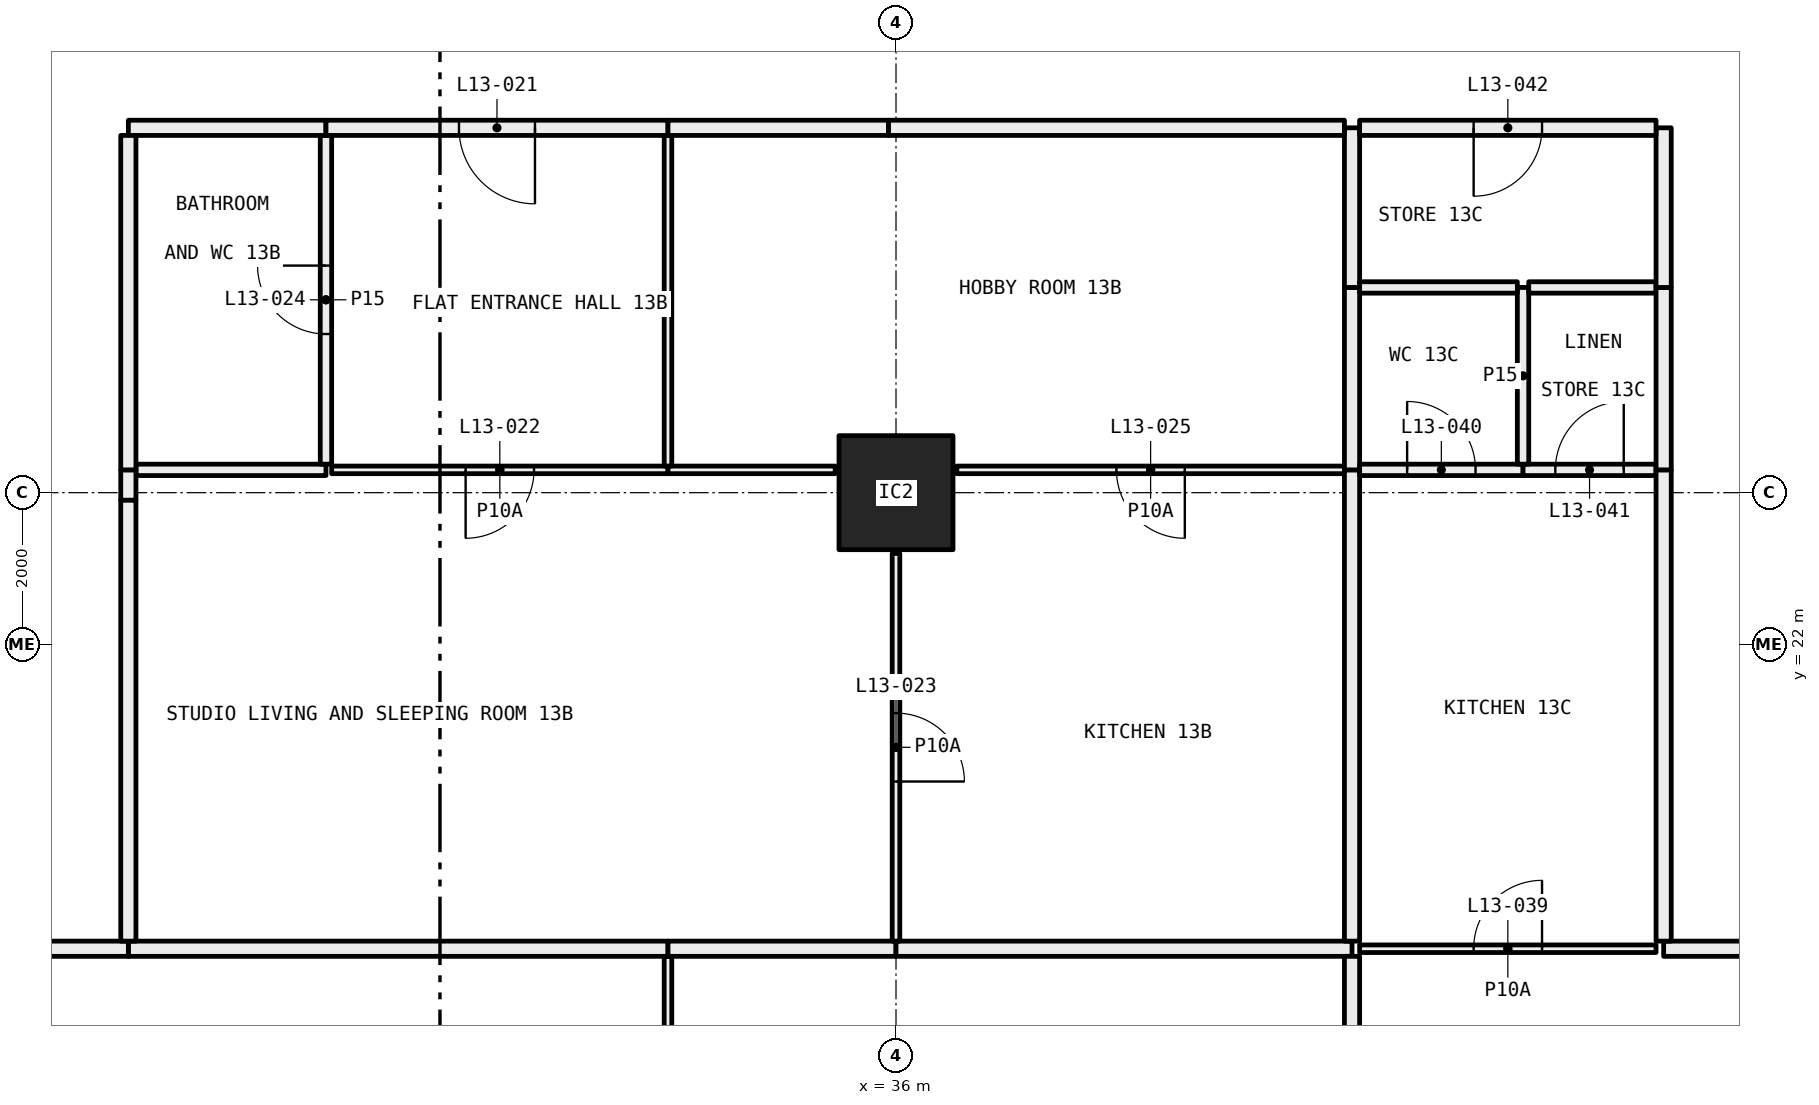
"""IFC4 building model, lengths in metres.
Left out: names, types, materials, properties, quantities, classifications, styles, units other than length and angle.
Written with IfcOpenShell. Run it as: python <this file> out.ifc"""

import sys

from ifc_helpers import new_model, si_unit, direction, frame, frame_2d, origin, origin_2d, place, context, subcontext, project, spatial, rectangle, hollow_rectangle, extrude, element, fill, save


model = new_model("IFC4")
c1 = context("Model", 3, precision=1e-05, world=origin(), true_north=direction((0.0, 1.0)))
c2 = subcontext(c1, "Body", "Model", "MODEL_VIEW")
j1 = project(units=[si_unit("LENGTHUNIT", "METRE"), si_unit("PLANEANGLEUNIT", "RADIAN")], contexts=[c1])
p1 = place(None, origin())
s1 = spatial("IfcSite", under=j1, at=p1, CompositionType="ELEMENT")
p2 = place(p1, origin())
s2 = spatial("IfcBuilding", under=s1, at=p2, CompositionType="ELEMENT")
p3 = place(p2, frame((0.0, 0.0, 57.6)))
s3 = spatial("IfcBuildingStorey", under=s2, at=p3, CompositionType="ELEMENT", Elevation=57.6)
p4 = place(p3, frame((36.0, 24.0, 0.0), z_axis=(0.0, 0.0, 1.0), x_axis=(1.0, 0.0, 0.0)))
e1 = element("IfcColumn", 1, at=p4, inside=s3, PredefinedType="COLUMN", context=c2, shape_type="SweptSolid", body=[
    extrude(hollow_rectangle(XDim=1.5, YDim=1.5, WallThickness=0.065, at=origin_2d()), origin(), (0.0, 0.0, 1.0), 3.05),
])
p5 = place(p3, frame((33.0, 12.05, 0.0), z_axis=(0.0, 0.0, 1.0), x_axis=(0.0, 1.0, 0.0)))
e2 = element("IfcWall", 2, at=p5, inside=s3, PredefinedType="PARTITIONING", context=c2, shape_type="SweptSolid", body=[
    extrude(rectangle(XDim=5.85, YDim=0.1, at=frame_2d((2.925, 0.0))), origin(), (0.0, 0.0, 1.0), 2.45),
])
p6 = place(p3, frame((33.0, 18.0, 0.0), z_axis=(0.0, 0.0, 1.0), x_axis=(-1.0, 0.0, 0.0)))
e3 = element("IfcWall", 3, at=p6, inside=s3, PredefinedType="PARTITIONING", context=c2, shape_type="SweptSolid", body=[
    extrude(rectangle(XDim=7.1, YDim=0.2, at=frame_2d((3.55, 0.0))), origin(), (0.0, 0.0, 1.0), 3.05),
])
p7 = place(p3, frame((25.9, 18.0, 0.0), z_axis=(0.0, 0.0, 1.0), x_axis=(-1.0, 0.0, 0.0)))
e4 = element("IfcWall", 4, at=p7, inside=s3, PredefinedType="PARTITIONING", context=c2, shape_type="SweptSolid", body=[
    extrude(rectangle(XDim=1.9, YDim=0.2, at=frame_2d((0.95, 0.0))), origin(), (0.0, 0.0, 1.0), 3.05),
])
p8 = place(p3, frame((36.0, 18.0, 0.0), z_axis=(0.0, 0.0, 1.0), x_axis=(-1.0, 0.0, 0.0)))
e5 = element("IfcWall", 5, at=p8, inside=s3, PredefinedType="PARTITIONING", context=c2, shape_type="SweptSolid", body=[
    extrude(rectangle(XDim=3.0, YDim=0.2, at=frame_2d((1.5, 0.0))), origin(), (0.0, 0.0, 1.0), 2.45),
])
p9 = place(p3, frame((42.0, 18.0, 0.0), z_axis=(0.0, 0.0, 1.0), x_axis=(-1.0, 0.0, 0.0)))
e6 = element("IfcWall", 6, at=p9, inside=s3, PredefinedType="PARTITIONING", context=c2, shape_type="SweptSolid", body=[
    extrude(rectangle(XDim=6.0, YDim=0.2, at=frame_2d((3.0, 0.0))), origin(), (0.0, 0.0, 1.0), 2.45),
])
p10 = place(p3, frame((42.0, 12.0, 0.0), z_axis=(0.0, 0.0, 1.0), x_axis=(0.0, 1.0, 0.0)))
e7 = element("IfcWall", 7, at=p10, inside=s3, PredefinedType="PARTITIONING", context=c2, shape_type="SweptSolid", body=[
    extrude(rectangle(XDim=5.9, YDim=0.2, at=frame_2d((2.95, 0.0))), origin(), (0.0, 0.0, 1.0), 2.45),
])
p11 = place(p3, frame((36.0, 18.1, 0.0), z_axis=(0.0, 0.0, 1.0), x_axis=(0.0, 1.0, 0.0)))
e8 = element("IfcWall", 8, at=p11, inside=s3, PredefinedType="PARTITIONING", context=c2, shape_type="SweptSolid", body=[
    extrude(rectangle(XDim=5.1, YDim=0.1, at=frame_2d((2.55, 0.0))), origin(), (0.0, 0.0, 1.0), 2.45),
])
p12 = place(p11, frame((2.1, 0.0, 0.0)))
e9 = element("IfcOpeningElement", 9, at=p12, cuts=e8, PredefinedType="OPENING", context=c2, shape_type="SweptSolid", body=[
    extrude(rectangle(XDim=0.9, YDim=2.1, at=frame_2d((0.45, 1.05))), frame((0.0, 0.06, 0.0), z_axis=(0.0, -1.0, 0.0), x_axis=(1.0, 0.0, 0.0)), (0.0, 0.0, 1.0), 0.12),
])
p13 = place(p3, frame((28.5, 24.3, 0.0), z_axis=(0.0, 0.0, 1.0), x_axis=(-1.0, 0.0, 0.0)))
e10 = element("IfcWall", 10, at=p13, inside=s3, PredefinedType="PARTITIONING", context=c2, shape_type="SweptSolid", body=[
    extrude(rectangle(XDim=2.5, YDim=0.15, at=frame_2d((1.25, 0.0))), origin(), (0.0, 0.0, 1.0), 3.05),
])
p14 = place(p3, frame((33.0, 24.3, 0.0), z_axis=(0.0, 0.0, 1.0), x_axis=(-1.0, 0.0, 0.0)))
e11 = element("IfcWall", 11, at=p14, inside=s3, PredefinedType="PARTITIONING", context=c2, shape_type="SweptSolid", body=[
    extrude(rectangle(XDim=4.425, YDim=0.1, at=frame_2d((2.212, 0.0))), origin(), (0.0, 0.0, 1.0), 3.05),
])
p15 = place(p14, frame((1.762, 0.0, 0.0)))
e12 = element("IfcOpeningElement", 12, at=p15, cuts=e11, PredefinedType="OPENING", context=c2, shape_type="SweptSolid", body=[
    extrude(rectangle(XDim=0.9, YDim=2.1, at=frame_2d((0.45, 1.05))), frame((0.0, 0.06, 0.0), z_axis=(0.0, -1.0, 0.0), x_axis=(1.0, 0.0, 0.0)), (0.0, 0.0, 1.0), 0.12),
])
p16 = place(p3, frame((35.2, 24.3, 0.0), z_axis=(0.0, 0.0, 1.0), x_axis=(-1.0, 0.0, 0.0)))
e13 = element("IfcWall", 13, at=p16, inside=s3, PredefinedType="PARTITIONING", context=c2, shape_type="SweptSolid", body=[
    extrude(rectangle(XDim=2.2, YDim=0.1, at=frame_2d((1.1, 0.0))), origin(), (0.0, 0.0, 1.0), 3.05),
])
p17 = place(p3, frame((25.9, 24.3, 0.0), z_axis=(0.0, 0.0, 1.0), x_axis=(0.0, -1.0, 0.0)))
e14 = element("IfcWall", 14, at=p17, inside=s3, PredefinedType="PARTITIONING", context=c2, shape_type="SweptSolid", body=[
    extrude(rectangle(XDim=0.4, YDim=0.2, at=frame_2d((0.2, 0.0))), origin(), (0.0, 0.0, 1.0), 2.45),
])
p18 = place(p3, frame((25.9, 23.9, 0.0), z_axis=(0.0, 0.0, 1.0), x_axis=(0.0, -1.0, 0.0)))
e15 = element("IfcWall", 15, at=p18, inside=s3, PredefinedType="PARTITIONING", context=c2, shape_type="SweptSolid", body=[
    extrude(rectangle(XDim=5.8, YDim=0.2, at=frame_2d((2.9, 0.0))), origin(), (0.0, 0.0, 1.0), 3.05),
])
p19 = place(p3, frame((41.9, 24.3, 0.0), z_axis=(0.0, 0.0, 1.0), x_axis=(-1.0, 0.0, 0.0)))
e16 = element("IfcWall", 16, at=p19, inside=s3, PredefinedType="PARTITIONING", context=c2, shape_type="SweptSolid", body=[
    extrude(rectangle(XDim=5.1, YDim=0.1, at=frame_2d((2.55, 0.0))), origin(), (0.0, 0.0, 1.0), 3.05),
])
p20 = place(p19, frame((2.1, 0.0, 0.0)))
e17 = element("IfcOpeningElement", 17, at=p20, cuts=e16, PredefinedType="OPENING", context=c2, shape_type="SweptSolid", body=[
    extrude(rectangle(XDim=0.9, YDim=2.1, at=frame_2d((0.45, 1.05))), frame((0.0, 0.06, 0.0), z_axis=(0.0, -1.0, 0.0), x_axis=(1.0, 0.0, 0.0)), (0.0, 0.0, 1.0), 0.12),
])
p21 = place(p3, frame((42.0, 18.1, 0.0), z_axis=(0.0, 0.0, 1.0), x_axis=(0.0, 1.0, 0.0)))
e18 = element("IfcWall", 18, at=p21, inside=s3, PredefinedType="PARTITIONING", context=c2, shape_type="SweptSolid", body=[
    extrude(rectangle(XDim=6.2, YDim=0.2, at=frame_2d((3.1, 0.0))), origin(), (0.0, 0.0, 1.0), 2.45),
])
p22 = place(p3, frame((28.5, 24.375, 0.0), z_axis=(0.0, 0.0, 1.0), x_axis=(0.0, 1.0, 0.0)))
e19 = element("IfcWall", 19, at=p22, inside=s3, PredefinedType="PARTITIONING", context=c2, shape_type="SweptSolid", body=[
    extrude(rectangle(XDim=4.325, YDim=0.15, at=frame_2d((2.163, 0.0))), origin(), (0.0, 0.0, 1.0), 3.05),
])
p23 = place(p22, frame((1.712, 0.0, 0.0)))
e20 = element("IfcOpeningElement", 20, at=p23, cuts=e19, PredefinedType="OPENING", context=c2, shape_type="SweptSolid", body=[
    extrude(rectangle(XDim=0.9, YDim=2.1, at=frame_2d((0.45, 1.05))), frame((0.0, 0.085, 0.0), z_axis=(0.0, -1.0, 0.0), x_axis=(1.0, 0.0, 0.0)), (0.0, 0.0, 1.0), 0.17),
])
p24 = place(p3, frame((28.5, 28.8, 0.0), z_axis=(0.0, 0.0, 1.0), x_axis=(-1.0, 0.0, 0.0)))
e21 = element("IfcWall", 21, at=p24, inside=s3, PredefinedType="PARTITIONING", context=c2, shape_type="SweptSolid", body=[
    extrude(rectangle(XDim=2.6, YDim=0.2, at=frame_2d((1.3, 0.0))), origin(), (0.0, 0.0, 1.0), 3.05),
])
p25 = place(p3, frame((25.9, 28.7, 0.0), z_axis=(0.0, 0.0, 1.0), x_axis=(0.0, -1.0, 0.0)))
e22 = element("IfcWall", 22, at=p25, inside=s3, PredefinedType="PARTITIONING", context=c2, shape_type="SweptSolid", body=[
    extrude(rectangle(XDim=4.4, YDim=0.2, at=frame_2d((2.2, 0.0))), origin(), (0.0, 0.0, 1.0), 3.05),
])
p26 = place(p3, frame((33.0, 24.35, 0.0), z_axis=(0.0, 0.0, 1.0), x_axis=(0.0, 1.0, 0.0)))
e23 = element("IfcWall", 23, at=p26, inside=s3, PredefinedType="PARTITIONING", context=c2, shape_type="SweptSolid", body=[
    extrude(rectangle(XDim=4.35, YDim=0.1, at=frame_2d((2.175, 0.0))), origin(), (0.0, 0.0, 1.0), 3.05),
])
p27 = place(p3, frame((33.0, 28.8, 0.0), z_axis=(0.0, 0.0, 1.0), x_axis=(-1.0, 0.0, 0.0)))
e24 = element("IfcWall", 24, at=p27, inside=s3, PredefinedType="PARTITIONING", context=c2, shape_type="SweptSolid", body=[
    extrude(rectangle(XDim=4.5, YDim=0.2, at=frame_2d((2.25, 0.0))), origin(), (0.0, 0.0, 1.0), 3.05),
])
p28 = place(p27, frame((1.75, 0.0, 0.0)))
e25 = element("IfcOpeningElement", 25, at=p28, cuts=e24, PredefinedType="OPENING", context=c2, shape_type="SweptSolid", body=[
    extrude(rectangle(XDim=1.0, YDim=2.1, at=frame_2d((0.5, 1.05))), frame((0.0, 0.11, 0.0), z_axis=(0.0, -1.0, 0.0), x_axis=(1.0, 0.0, 0.0)), (0.0, 0.0, 1.0), 0.22),
])
p29 = place(p3, frame((42.0, 24.3, 0.0), z_axis=(0.0, 0.0, 1.0), x_axis=(0.0, 1.0, 0.0)))
e26 = element("IfcWall", 26, at=p29, inside=s3, PredefinedType="PARTITIONING", context=c2, shape_type="SweptSolid", body=[
    extrude(rectangle(XDim=2.4, YDim=0.2, at=frame_2d((1.2, 0.0))), origin(), (0.0, 0.0, 1.0), 3.05),
])
p30 = place(p3, frame((42.0, 26.7, 0.0), z_axis=(0.0, 0.0, 1.0), x_axis=(0.0, 1.0, 0.0)))
e27 = element("IfcWall", 27, at=p30, inside=s3, PredefinedType="PARTITIONING", context=c2, shape_type="SweptSolid", body=[
    extrude(rectangle(XDim=2.1, YDim=0.2, at=frame_2d((1.05, 0.0))), origin(), (0.0, 0.0, 1.0), 3.05),
])
p31 = place(p3, frame((41.9, 28.8, 0.0), z_axis=(0.0, 0.0, 1.0), x_axis=(-1.0, 0.0, 0.0)))
e28 = element("IfcWall", 28, at=p31, inside=s3, PredefinedType="PARTITIONING", context=c2, shape_type="SweptSolid", body=[
    extrude(rectangle(XDim=6.0, YDim=0.2, at=frame_2d((3.0, 0.0))), origin(), (0.0, 0.0, 1.0), 2.45),
])
p32 = place(p3, frame((35.9, 28.8, 0.0), z_axis=(0.0, 0.0, 1.0), x_axis=(-1.0, 0.0, 0.0)))
e29 = element("IfcWall", 29, at=p32, inside=s3, PredefinedType="PARTITIONING", context=c2, shape_type="SweptSolid", body=[
    extrude(rectangle(XDim=2.9, YDim=0.2, at=frame_2d((1.45, 0.0))), origin(), (0.0, 0.0, 1.0), 3.05),
])
p33 = place(p3, frame((46.0, 18.0, 0.0), z_axis=(0.0, 0.0, 1.0), x_axis=(-1.0, 0.0, 0.0)))
e30 = element("IfcWall", 30, at=p33, inside=s3, PredefinedType="PARTITIONING", context=c2, shape_type="SweptSolid", body=[
    extrude(rectangle(XDim=3.9, YDim=0.1, at=frame_2d((1.95, 0.0))), origin(), (0.0, 0.0, 1.0), 3.05),
])
p34 = place(p33, frame((1.5, 0.0, 0.0)))
e31 = element("IfcOpeningElement", 31, at=p34, cuts=e30, PredefinedType="OPENING", context=c2, shape_type="SweptSolid", body=[
    extrude(rectangle(XDim=0.9, YDim=2.1, at=frame_2d((0.45, 1.05))), frame((0.0, 0.06, 0.0), z_axis=(0.0, -1.0, 0.0), x_axis=(1.0, 0.0, 0.0)), (0.0, 0.0, 1.0), 0.12),
])
p35 = place(p3, frame((52.5, 18.0, 0.0), z_axis=(0.0, 0.0, 1.0), x_axis=(-1.0, 0.0, 0.0)))
e32 = element("IfcWall", 32, at=p35, inside=s3, PredefinedType="PARTITIONING", context=c2, shape_type="SweptSolid", body=[
    extrude(rectangle(XDim=6.4, YDim=0.2, at=frame_2d((3.2, 0.0))), origin(), (0.0, 0.0, 1.0), 3.05),
])
p36 = place(p3, frame((44.25, 24.3, 0.0), z_axis=(0.0, 0.0, 1.0), x_axis=(-1.0, 0.0, 0.0)))
e33 = element("IfcWall", 33, at=p36, inside=s3, PredefinedType="PARTITIONING", context=c2, shape_type="SweptSolid", body=[
    extrude(rectangle(XDim=2.15, YDim=0.15, at=frame_2d((1.075, 0.0))), origin(), (0.0, 0.0, 1.0), 3.05),
])
p37 = place(p36, frame((0.625, 0.0, 0.0)))
e34 = element("IfcOpeningElement", 34, at=p37, cuts=e33, PredefinedType="OPENING", context=c2, shape_type="SweptSolid", body=[
    extrude(rectangle(XDim=0.9, YDim=2.1, at=frame_2d((0.45, 1.05))), frame((0.0, 0.085, 0.0), z_axis=(0.0, -1.0, 0.0), x_axis=(1.0, 0.0, 0.0)), (0.0, 0.0, 1.0), 0.17),
])
p38 = place(p3, frame((46.0, 24.3, 0.0), z_axis=(0.0, 0.0, 1.0), x_axis=(-1.0, 0.0, 0.0)))
e35 = element("IfcWall", 35, at=p38, inside=s3, PredefinedType="PARTITIONING", context=c2, shape_type="SweptSolid", body=[
    extrude(rectangle(XDim=1.75, YDim=0.15, at=frame_2d((0.875, 0.0))), origin(), (0.0, 0.0, 1.0), 3.05),
])
p39 = place(p38, frame((0.425, 0.0, 0.0)))
e36 = element("IfcOpeningElement", 36, at=p39, cuts=e35, PredefinedType="OPENING", context=c2, shape_type="SweptSolid", body=[
    extrude(rectangle(XDim=0.9, YDim=2.1, at=frame_2d((0.45, 1.05))), frame((0.0, 0.085, 0.0), z_axis=(0.0, -1.0, 0.0), x_axis=(1.0, 0.0, 0.0)), (0.0, 0.0, 1.0), 0.17),
])
p40 = place(p3, frame((46.1, 18.1, 0.0), z_axis=(0.0, 0.0, 1.0), x_axis=(0.0, 1.0, 0.0)))
e37 = element("IfcWall", 37, at=p40, inside=s3, PredefinedType="PARTITIONING", context=c2, shape_type="SweptSolid", body=[
    extrude(rectangle(XDim=6.2, YDim=0.2, at=frame_2d((3.1, 0.0))), origin(), (0.0, 0.0, 1.0), 2.45),
])
p41 = place(p3, frame((44.25, 24.375, 0.0), z_axis=(0.0, 0.0, 1.0), x_axis=(0.0, 1.0, 0.0)))
e38 = element("IfcWall", 38, at=p41, inside=s3, PredefinedType="PARTITIONING", context=c2, shape_type="SweptSolid", body=[
    extrude(rectangle(XDim=2.325, YDim=0.15, at=frame_2d((1.163, 0.0))), origin(), (0.0, 0.0, 1.0), 3.05),
])
p42 = place(p3, frame((44.175, 26.7, 0.0), z_axis=(0.0, 0.0, 1.0), x_axis=(-1.0, 0.0, 0.0)))
e39 = element("IfcWall", 39, at=p42, inside=s3, PredefinedType="PARTITIONING", context=c2, shape_type="SweptSolid", body=[
    extrude(rectangle(XDim=2.075, YDim=0.15, at=frame_2d((1.038, 0.0))), origin(), (0.0, 0.0, 1.0), 3.05),
])
p43 = place(p3, frame((46.0, 26.7, 0.0), z_axis=(0.0, 0.0, 1.0), x_axis=(-1.0, 0.0, 0.0)))
e40 = element("IfcWall", 40, at=p43, inside=s3, PredefinedType="PARTITIONING", context=c2, shape_type="SweptSolid", body=[
    extrude(rectangle(XDim=1.675, YDim=0.15, at=frame_2d((0.837, 0.0))), origin(), (0.0, 0.0, 1.0), 3.05),
])
p44 = place(p3, frame((46.1, 24.3, 0.0), z_axis=(0.0, 0.0, 1.0), x_axis=(0.0, 1.0, 0.0)))
e41 = element("IfcWall", 41, at=p44, inside=s3, PredefinedType="PARTITIONING", context=c2, shape_type="SweptSolid", body=[
    extrude(rectangle(XDim=2.4, YDim=0.2, at=frame_2d((1.2, 0.0))), origin(), (0.0, 0.0, 1.0), 3.05),
])
p45 = place(p3, frame((46.1, 26.7, 0.0), z_axis=(0.0, 0.0, 1.0), x_axis=(0.0, 1.0, 0.0)))
e42 = element("IfcWall", 42, at=p45, inside=s3, PredefinedType="PARTITIONING", context=c2, shape_type="SweptSolid", body=[
    extrude(rectangle(XDim=2.1, YDim=0.2, at=frame_2d((1.05, 0.0))), origin(), (0.0, 0.0, 1.0), 3.05),
])
p46 = place(p3, frame((46.0, 28.8, 0.0), z_axis=(0.0, 0.0, 1.0), x_axis=(-1.0, 0.0, 0.0)))
e43 = element("IfcWall", 43, at=p46, inside=s3, PredefinedType="PARTITIONING", context=c2, shape_type="SweptSolid", body=[
    extrude(rectangle(XDim=3.9, YDim=0.2, at=frame_2d((1.95, 0.0))), origin(), (0.0, 0.0, 1.0), 3.05),
])
p47 = place(p46, frame((1.5, 0.0, 0.0)))
e44 = element("IfcOpeningElement", 44, at=p47, cuts=e43, PredefinedType="OPENING", context=c2, shape_type="SweptSolid", body=[
    extrude(rectangle(XDim=0.9, YDim=2.1, at=frame_2d((0.45, 1.05))), frame((0.0, 0.11, 0.0), z_axis=(0.0, -1.0, 0.0), x_axis=(1.0, 0.0, 0.0)), (0.0, 0.0, 1.0), 0.22),
])
p48 = place(p28, origin())
e45 = element("IfcDoor", 45, at=p48, inside=s3, OperationType="SINGLE_SWING_RIGHT", PredefinedType="DOOR", context=c2, shape_type="SweptSolid", body=[
    extrude(rectangle(XDim=1.0, YDim=2.1, at=frame_2d((0.5, 1.05))), frame((0.0, 0.025, 0.0), z_axis=(0.0, -1.0, 0.0), x_axis=(1.0, 0.0, 0.0)), (0.0, 0.0, 1.0), 0.05),
])
fill(e25, e45)
p49 = place(p15, origin())
e46 = element("IfcDoor", 46, at=p49, inside=s3, OperationType="SINGLE_SWING_LEFT", PredefinedType="DOOR", context=c2, shape_type="SweptSolid", body=[
    extrude(rectangle(XDim=0.9, YDim=2.1, at=frame_2d((0.45, 1.05))), frame((0.0, 0.025, 0.0), z_axis=(0.0, -1.0, 0.0), x_axis=(1.0, 0.0, 0.0)), (0.0, 0.0, 1.0), 0.05),
])
fill(e12, e46)
p50 = place(p12, frame((0.9, 0.0, 0.0), x_axis=(-1.0, 0.0, 0.0)))
e47 = element("IfcDoor", 47, at=p50, inside=s3, OperationType="SINGLE_SWING_LEFT", PredefinedType="DOOR", context=c2, shape_type="SweptSolid", body=[
    extrude(rectangle(XDim=0.9, YDim=2.1, at=frame_2d((0.45, 1.05))), frame((0.0, 0.025, 0.0), z_axis=(0.0, -1.0, 0.0), x_axis=(1.0, 0.0, 0.0)), (0.0, 0.0, 1.0), 0.05),
])
fill(e9, e47)
p51 = place(p23, origin())
e48 = element("IfcDoor", 48, at=p51, inside=s3, OperationType="SINGLE_SWING_LEFT", PredefinedType="DOOR", context=c2, shape_type="SweptSolid", body=[
    extrude(rectangle(XDim=0.9, YDim=2.1, at=frame_2d((0.45, 1.05))), frame((0.0, 0.025, 0.0), z_axis=(0.0, -1.0, 0.0), x_axis=(1.0, 0.0, 0.0)), (0.0, 0.0, 1.0), 0.05),
])
fill(e20, e48)
p52 = place(p20, origin())
e49 = element("IfcDoor", 49, at=p52, inside=s3, OperationType="SINGLE_SWING_RIGHT", PredefinedType="DOOR", context=c2, shape_type="SweptSolid", body=[
    extrude(rectangle(XDim=0.9, YDim=2.1, at=frame_2d((0.45, 1.05))), frame((0.0, 0.025, 0.0), z_axis=(0.0, -1.0, 0.0), x_axis=(1.0, 0.0, 0.0)), (0.0, 0.0, 1.0), 0.05),
])
fill(e17, e49)
p53 = place(p34, frame((0.9, 0.0, 0.0), x_axis=(-1.0, 0.0, 0.0)))
e50 = element("IfcDoor", 50, at=p53, inside=s3, OperationType="SINGLE_SWING_LEFT", PredefinedType="DOOR", context=c2, shape_type="SweptSolid", body=[
    extrude(rectangle(XDim=0.9, YDim=2.1, at=frame_2d((0.45, 1.05))), frame((0.0, 0.025, 0.0), z_axis=(0.0, -1.0, 0.0), x_axis=(1.0, 0.0, 0.0)), (0.0, 0.0, 1.0), 0.05),
])
fill(e31, e50)
p54 = place(p37, frame((0.9, 0.0, 0.0), x_axis=(-1.0, 0.0, 0.0)))
e51 = element("IfcDoor", 51, at=p54, inside=s3, OperationType="SINGLE_SWING_RIGHT", PredefinedType="DOOR", context=c2, shape_type="SweptSolid", body=[
    extrude(rectangle(XDim=0.9, YDim=2.1, at=frame_2d((0.45, 1.05))), frame((0.0, 0.025, 0.0), z_axis=(0.0, -1.0, 0.0), x_axis=(1.0, 0.0, 0.0)), (0.0, 0.0, 1.0), 0.05),
])
fill(e34, e51)
p55 = place(p39, frame((0.9, 0.0, 0.0), x_axis=(-1.0, 0.0, 0.0)))
e52 = element("IfcDoor", 52, at=p55, inside=s3, OperationType="SINGLE_SWING_LEFT", PredefinedType="DOOR", context=c2, shape_type="SweptSolid", body=[
    extrude(rectangle(XDim=0.9, YDim=2.1, at=frame_2d((0.45, 1.05))), frame((0.0, 0.025, 0.0), z_axis=(0.0, -1.0, 0.0), x_axis=(1.0, 0.0, 0.0)), (0.0, 0.0, 1.0), 0.05),
])
fill(e36, e52)
p56 = place(p47, origin())
e53 = element("IfcDoor", 53, at=p56, inside=s3, OperationType="SINGLE_SWING_LEFT", PredefinedType="DOOR", context=c2, shape_type="SweptSolid", body=[
    extrude(rectangle(XDim=0.9, YDim=2.1, at=frame_2d((0.45, 1.05))), frame((0.0, 0.025, 0.0), z_axis=(0.0, -1.0, 0.0), x_axis=(1.0, 0.0, 0.0)), (0.0, 0.0, 1.0), 0.05),
])
fill(e44, e53)
save(model, sys.argv[1])
